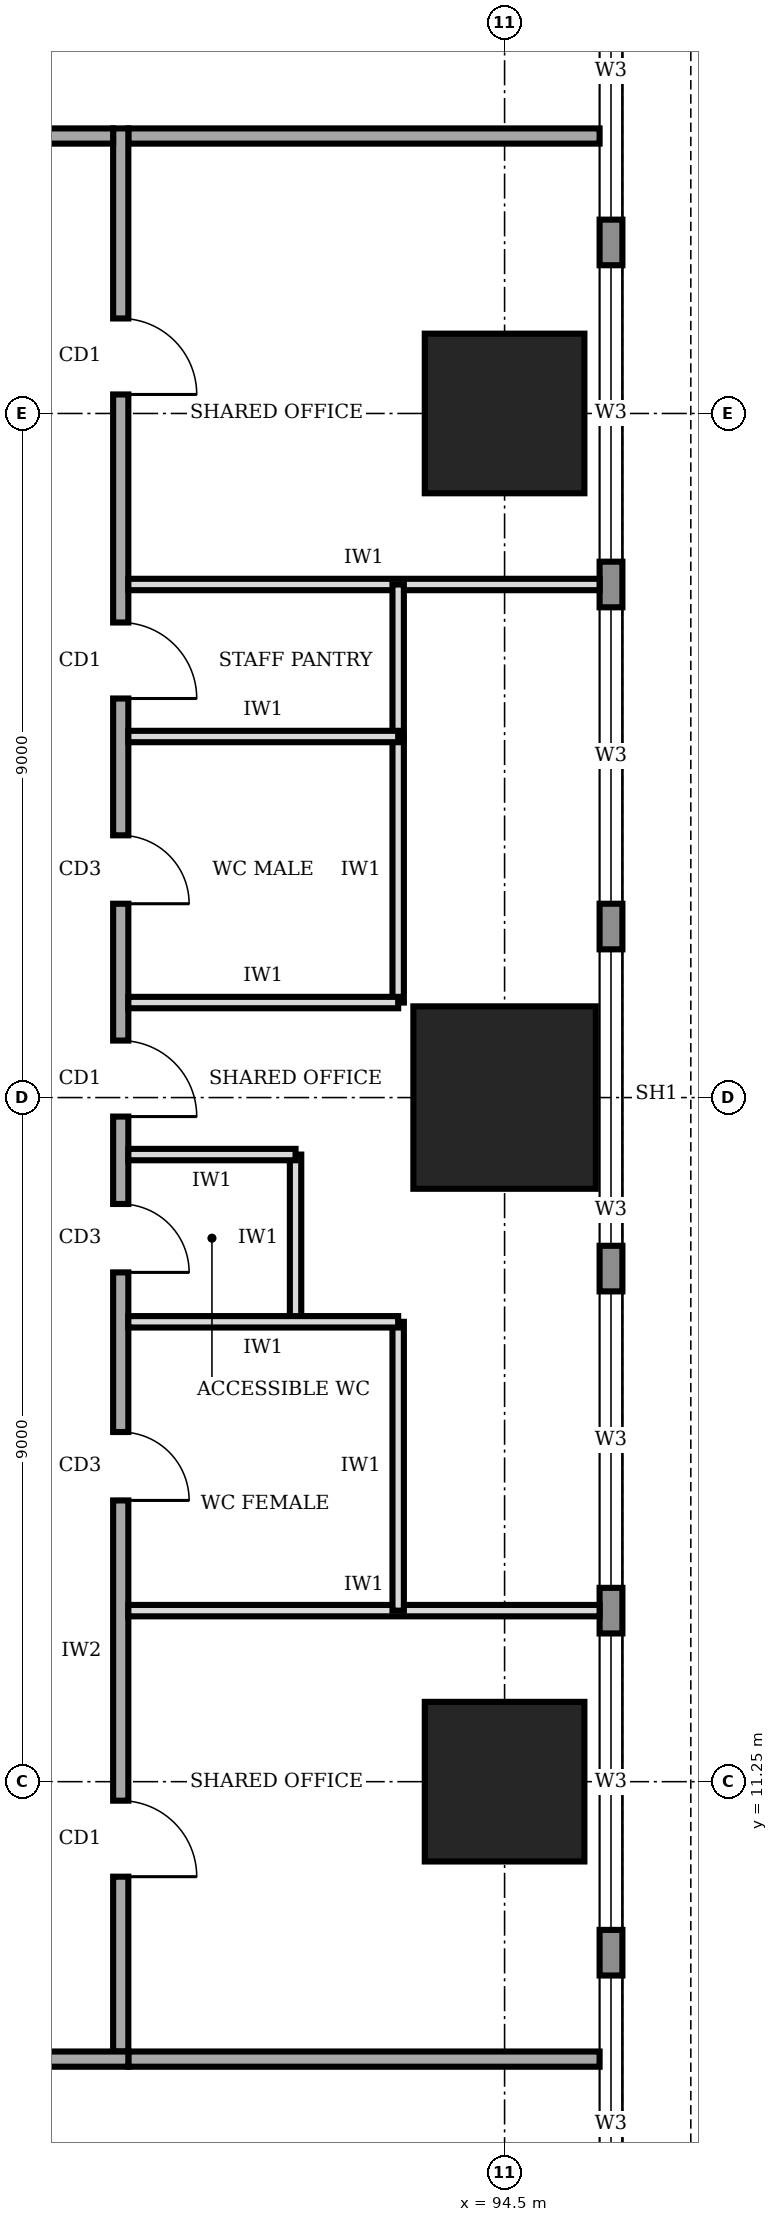
"""IFC4 building model, lengths in metres.
Left out: names, types, materials, properties, quantities, classifications, styles, units other than length and angle.
Written with IfcOpenShell. Run it as: python <this file> out.ifc"""

import sys

from ifc_helpers import new_model, si_unit, direction, frame, frame_2d, origin, origin_2d, place, context, subcontext, project, spatial, rectangle, extrude, element, fill, save


model = new_model("IFC4")
c1 = context("Model", 3, precision=1e-05, world=origin(), true_north=direction((0.0, 1.0)))
c2 = subcontext(c1, "Body", "Model", "MODEL_VIEW")
j1 = project(units=[si_unit("LENGTHUNIT", "METRE"), si_unit("PLANEANGLEUNIT", "RADIAN")], contexts=[c1])
p1 = place(None, origin())
s1 = spatial("IfcSite", under=j1, at=p1, CompositionType="ELEMENT")
p2 = place(p1, origin())
s2 = spatial("IfcBuilding", under=s1, at=p2, CompositionType="ELEMENT")
p3 = place(p2, frame((0.0, 0.0, 93.0)))
s3 = spatial("IfcBuildingStorey", under=s2, at=p3, CompositionType="ELEMENT", Elevation=93.0)
p4 = place(p3, frame((94.5, 11.25, 0.0), z_axis=(0.0, 0.0, 1.0), x_axis=(1.0, 0.0, 0.0)))
e1 = element("IfcColumn", 1, at=p4, inside=s3, PredefinedType="COLUMN", context=c2, shape_type="SweptSolid", body=[
    extrude(rectangle(XDim=2.1, YDim=2.1, at=origin_2d()), origin(), (0.0, 0.0, 1.0), 4.0),
])
p5 = place(p3, frame((94.5, 20.25, 0.0), z_axis=(0.0, 0.0, 1.0), x_axis=(1.0, 0.0, 0.0)))
e2 = element("IfcColumn", 2, at=p5, inside=s3, PredefinedType="COLUMN", context=c2, shape_type="SweptSolid", body=[
    extrude(rectangle(XDim=2.4, YDim=2.4, at=origin_2d()), origin(), (0.0, 0.0, 1.0), 4.0),
])
p6 = place(p3, frame((94.5, 29.25, 0.0), z_axis=(0.0, 0.0, 1.0), x_axis=(1.0, 0.0, 0.0)))
e3 = element("IfcColumn", 3, at=p6, inside=s3, PredefinedType="COLUMN", context=c2, shape_type="SweptSolid", body=[
    extrude(rectangle(XDim=2.1, YDim=2.1, at=origin_2d()), origin(), (0.0, 0.0, 1.0), 4.0),
])
p7 = place(p3, frame((95.9, 3.32, 0.0), z_axis=(0.0, 0.0, 1.0), x_axis=(0.0, 1.0, 0.0)))
e4 = element("IfcWall", 4, at=p7, inside=s3, PredefinedType="STANDARD", context=c2, shape_type="SweptSolid", body=[
    extrude(rectangle(XDim=33.96, YDim=0.3, at=frame_2d((16.98, 0.0))), origin(), (0.0, 0.0, 1.0), 3.75),
])
p8 = place(p7, frame((1.48, 0.0, 0.95)))
e5 = element("IfcOpeningElement", 5, at=p8, cuts=e4, PredefinedType="OPENING", context=c2, shape_type="SweptSolid", body=[
    extrude(rectangle(XDim=3.9, YDim=1.8, at=frame_2d((1.95, 0.9))), frame((0.0, 0.16, 0.0), z_axis=(0.0, -1.0, 0.0), x_axis=(1.0, 0.0, 0.0)), (0.0, 0.0, 1.0), 0.32),
])
p9 = place(p7, frame((5.98, 0.0, 0.95)))
e6 = element("IfcOpeningElement", 6, at=p9, cuts=e4, PredefinedType="OPENING", context=c2, shape_type="SweptSolid", body=[
    extrude(rectangle(XDim=3.9, YDim=1.8, at=frame_2d((1.95, 0.9))), frame((0.0, 0.16, 0.0), z_axis=(0.0, -1.0, 0.0), x_axis=(1.0, 0.0, 0.0)), (0.0, 0.0, 1.0), 0.32),
])
p10 = place(p7, frame((10.48, 0.0, 0.95)))
e7 = element("IfcOpeningElement", 7, at=p10, cuts=e4, PredefinedType="OPENING", context=c2, shape_type="SweptSolid", body=[
    extrude(rectangle(XDim=3.9, YDim=1.8, at=frame_2d((1.95, 0.9))), frame((0.0, 0.16, 0.0), z_axis=(0.0, -1.0, 0.0), x_axis=(1.0, 0.0, 0.0)), (0.0, 0.0, 1.0), 0.32),
])
p11 = place(p7, frame((14.98, 0.0, 0.95)))
e8 = element("IfcOpeningElement", 8, at=p11, cuts=e4, PredefinedType="OPENING", context=c2, shape_type="SweptSolid", body=[
    extrude(rectangle(XDim=3.9, YDim=1.8, at=frame_2d((1.95, 0.9))), frame((0.0, 0.16, 0.0), z_axis=(0.0, -1.0, 0.0), x_axis=(1.0, 0.0, 0.0)), (0.0, 0.0, 1.0), 0.32),
])
p12 = place(p7, frame((19.48, 0.0, 0.95)))
e9 = element("IfcOpeningElement", 9, at=p12, cuts=e4, PredefinedType="OPENING", context=c2, shape_type="SweptSolid", body=[
    extrude(rectangle(XDim=3.9, YDim=1.8, at=frame_2d((1.95, 0.9))), frame((0.0, 0.16, 0.0), z_axis=(0.0, -1.0, 0.0), x_axis=(1.0, 0.0, 0.0)), (0.0, 0.0, 1.0), 0.32),
])
p13 = place(p7, frame((23.98, 0.0, 0.95)))
e10 = element("IfcOpeningElement", 10, at=p13, cuts=e4, PredefinedType="OPENING", context=c2, shape_type="SweptSolid", body=[
    extrude(rectangle(XDim=3.9, YDim=1.8, at=frame_2d((1.95, 0.9))), frame((0.0, 0.16, 0.0), z_axis=(0.0, -1.0, 0.0), x_axis=(1.0, 0.0, 0.0)), (0.0, 0.0, 1.0), 0.32),
])
p14 = place(p7, frame((28.48, 0.0, 0.95)))
e11 = element("IfcOpeningElement", 11, at=p14, cuts=e4, PredefinedType="OPENING", context=c2, shape_type="SweptSolid", body=[
    extrude(rectangle(XDim=3.9, YDim=1.8, at=frame_2d((1.95, 0.9))), frame((0.0, 0.16, 0.0), z_axis=(0.0, -1.0, 0.0), x_axis=(1.0, 0.0, 0.0)), (0.0, 0.0, 1.0), 0.32),
])
p15 = place(p3, frame((63.3, 7.6, 0.0), z_axis=(0.0, 0.0, 1.0), x_axis=(1.0, 0.0, 0.0)))
e12 = element("IfcWall", 12, at=p15, inside=s3, PredefinedType="SOLIDWALL", context=c2, shape_type="SweptSolid", body=[
    extrude(rectangle(XDim=26.25, YDim=0.2, at=frame_2d((13.125, 0.0))), origin(), (0.0, 0.0, 1.0), 3.75),
])
p16 = place(p15, frame((6.0, 0.0, 0.0)))
e13 = element("IfcOpeningElement", 13, at=p16, cuts=e12, PredefinedType="OPENING", context=c2, shape_type="SweptSolid", body=[
    extrude(rectangle(XDim=1.0, YDim=2.1, at=frame_2d((0.5, 1.05))), frame((0.0, 0.11, 0.0), z_axis=(0.0, -1.0, 0.0), x_axis=(1.0, 0.0, 0.0)), (0.0, 0.0, 1.0), 0.22),
])
p17 = place(p15, frame((19.325, 0.0, 0.0)))
e14 = element("IfcOpeningElement", 14, at=p17, cuts=e12, PredefinedType="OPENING", context=c2, shape_type="SweptSolid", body=[
    extrude(rectangle(XDim=1.0, YDim=2.1, at=frame_2d((0.5, 1.05))), frame((0.0, 0.11, 0.0), z_axis=(0.0, -1.0, 0.0), x_axis=(1.0, 0.0, 0.0)), (0.0, 0.0, 1.0), 0.22),
])
p18 = place(p3, frame((89.45, 7.7, 0.0), z_axis=(0.0, 0.0, 1.0), x_axis=(0.0, 1.0, 0.0)))
e15 = element("IfcWall", 15, at=p18, inside=s3, PredefinedType="SOLIDWALL", context=c2, shape_type="SweptSolid", body=[
    extrude(rectangle(XDim=25.3, YDim=0.2, at=frame_2d((12.65, 0.0))), origin(), (0.0, 0.0, 1.0), 3.75),
])
p19 = place(p18, frame((2.3, 0.0, 0.0)))
e16 = element("IfcOpeningElement", 16, at=p19, cuts=e15, PredefinedType="OPENING", context=c2, shape_type="SweptSolid", body=[
    extrude(rectangle(XDim=1.0, YDim=2.1, at=frame_2d((0.5, 1.05))), frame((0.0, 0.11, 0.0), z_axis=(0.0, -1.0, 0.0), x_axis=(1.0, 0.0, 0.0)), (0.0, 0.0, 1.0), 0.22),
])
p20 = place(p18, frame((7.25, 0.0, 0.0)))
e17 = element("IfcOpeningElement", 17, at=p20, cuts=e15, PredefinedType="OPENING", context=c2, shape_type="SweptSolid", body=[
    extrude(rectangle(XDim=0.9, YDim=2.1, at=frame_2d((0.45, 1.05))), frame((0.0, 0.11, 0.0), z_axis=(0.0, -1.0, 0.0), x_axis=(1.0, 0.0, 0.0)), (0.0, 0.0, 1.0), 0.22),
])
p21 = place(p18, frame((10.25, 0.0, 0.0)))
e18 = element("IfcOpeningElement", 18, at=p21, cuts=e15, PredefinedType="OPENING", context=c2, shape_type="SweptSolid", body=[
    extrude(rectangle(XDim=0.9, YDim=2.1, at=frame_2d((0.45, 1.05))), frame((0.0, 0.11, 0.0), z_axis=(0.0, -1.0, 0.0), x_axis=(1.0, 0.0, 0.0)), (0.0, 0.0, 1.0), 0.22),
])
p22 = place(p18, frame((15.1, 0.0, 0.0)))
e19 = element("IfcOpeningElement", 19, at=p22, cuts=e15, PredefinedType="OPENING", context=c2, shape_type="SweptSolid", body=[
    extrude(rectangle(XDim=0.9, YDim=2.1, at=frame_2d((0.45, 1.05))), frame((0.0, 0.11, 0.0), z_axis=(0.0, -1.0, 0.0), x_axis=(1.0, 0.0, 0.0)), (0.0, 0.0, 1.0), 0.22),
])
p23 = place(p18, frame((17.8, 0.0, 0.0)))
e20 = element("IfcOpeningElement", 20, at=p23, cuts=e15, PredefinedType="OPENING", context=c2, shape_type="SweptSolid", body=[
    extrude(rectangle(XDim=1.0, YDim=2.1, at=frame_2d((0.5, 1.05))), frame((0.0, 0.11, 0.0), z_axis=(0.0, -1.0, 0.0), x_axis=(1.0, 0.0, 0.0)), (0.0, 0.0, 1.0), 0.22),
])
p24 = place(p18, frame((12.3, 0.0, 0.0)))
e21 = element("IfcOpeningElement", 21, at=p24, cuts=e15, PredefinedType="OPENING", context=c2, shape_type="SweptSolid", body=[
    extrude(rectangle(XDim=1.0, YDim=2.1, at=frame_2d((0.5, 1.05))), frame((0.0, 0.11, 0.0), z_axis=(0.0, -1.0, 0.0), x_axis=(1.0, 0.0, 0.0)), (0.0, 0.0, 1.0), 0.22),
])
p25 = place(p18, frame((21.8, 0.0, 0.0)))
e22 = element("IfcOpeningElement", 22, at=p25, cuts=e15, PredefinedType="OPENING", context=c2, shape_type="SweptSolid", body=[
    extrude(rectangle(XDim=1.0, YDim=2.1, at=frame_2d((0.5, 1.05))), frame((0.0, 0.11, 0.0), z_axis=(0.0, -1.0, 0.0), x_axis=(1.0, 0.0, 0.0)), (0.0, 0.0, 1.0), 0.22),
])
p26 = place(p3, frame((89.35, 32.9, 0.0), z_axis=(0.0, 0.0, 1.0), x_axis=(-1.0, 0.0, 0.0)))
e23 = element("IfcWall", 23, at=p26, inside=s3, PredefinedType="SOLIDWALL", context=c2, shape_type="SweptSolid", body=[
    extrude(rectangle(XDim=26.05, YDim=0.2, at=frame_2d((13.025, 0.0))), origin(), (0.0, 0.0, 1.0), 3.75),
])
p27 = place(p26, frame((19.05, 0.0, 0.0)))
e24 = element("IfcOpeningElement", 24, at=p27, cuts=e23, PredefinedType="OPENING", context=c2, shape_type="SweptSolid", body=[
    extrude(rectangle(XDim=1.0, YDim=2.1, at=frame_2d((0.5, 1.05))), frame((0.0, 0.11, 0.0), z_axis=(0.0, -1.0, 0.0), x_axis=(1.0, 0.0, 0.0)), (0.0, 0.0, 1.0), 0.22),
])
p28 = place(p26, frame((7.85, 0.0, 0.0)))
e25 = element("IfcOpeningElement", 25, at=p28, cuts=e23, PredefinedType="OPENING", context=c2, shape_type="SweptSolid", body=[
    extrude(rectangle(XDim=1.0, YDim=2.1, at=frame_2d((0.5, 1.05))), frame((0.0, 0.11, 0.0), z_axis=(0.0, -1.0, 0.0), x_axis=(1.0, 0.0, 0.0)), (0.0, 0.0, 1.0), 0.22),
])
p29 = place(p26, frame((1.325, 0.0, 0.0)))
e26 = element("IfcOpeningElement", 26, at=p29, cuts=e23, PredefinedType="OPENING", context=c2, shape_type="SweptSolid", body=[
    extrude(rectangle(XDim=1.0, YDim=2.1, at=frame_2d((0.5, 1.05))), frame((0.0, 0.11, 0.0), z_axis=(0.0, -1.0, 0.0), x_axis=(1.0, 0.0, 0.0)), (0.0, 0.0, 1.0), 0.22),
])
for number, where, z_axis, x_axis in (
    (27, (89.55, 7.6, 0.0), (0.0, 0.0, 1.0), (1.0, 0.0, 0.0)),
    (28, (89.55, 32.9, 0.0), (0.0, 0.0, 1.0), (1.0, 0.0, 0.0)),
):
    element("IfcWall", number, at=place(p3, frame(where, z_axis=z_axis, x_axis=x_axis)), inside=s3, PredefinedType="SOLIDWALL", context=c2, shape_type="SweptSolid", body=[
        extrude(rectangle(XDim=6.2, YDim=0.2, at=frame_2d((3.1, 0.0))), origin(), (0.0, 0.0, 1.0), 3.75),
    ])
for number, where, z_axis, x_axis in (
    (29, (89.55, 13.5, 0.0), (0.0, 0.0, 1.0), (1.0, 0.0, 0.0)),
    (30, (89.55, 27.0, 0.0), (0.0, 0.0, 1.0), (1.0, 0.0, 0.0)),
):
    element("IfcWall", number, at=place(p3, frame(where, z_axis=z_axis, x_axis=x_axis)), inside=s3, PredefinedType="PARTITIONING", context=c2, shape_type="SweptSolid", body=[
        extrude(rectangle(XDim=6.2, YDim=0.15, at=frame_2d((3.1, 0.0))), origin(), (0.0, 0.0, 1.0), 3.75),
    ])
p30 = place(p3, frame((89.55, 17.3, 0.0), z_axis=(0.0, 0.0, 1.0), x_axis=(1.0, 0.0, 0.0)))
e31 = element("IfcWall", 31, at=p30, inside=s3, PredefinedType="PARTITIONING", context=c2, shape_type="SweptSolid", body=[
    extrude(rectangle(XDim=3.55, YDim=0.15, at=frame_2d((1.775, 0.0))), origin(), (0.0, 0.0, 1.0), 3.75),
])
p31 = place(p3, frame((89.55, 19.5, 0.0), z_axis=(0.0, 0.0, 1.0), x_axis=(1.0, 0.0, 0.0)))
e32 = element("IfcWall", 32, at=p31, inside=s3, PredefinedType="PARTITIONING", context=c2, shape_type="SweptSolid", body=[
    extrude(rectangle(XDim=2.2, YDim=0.15, at=frame_2d((1.1, 0.0))), origin(), (0.0, 0.0, 1.0), 2.85),
])
for number, where, z_axis, x_axis in (
    (33, (89.55, 21.5, 0.0), (0.0, 0.0, 1.0), (1.0, 0.0, 0.0)),
    (34, (89.55, 25.0, 0.0), (0.0, 0.0, 1.0), (1.0, 0.0, 0.0)),
):
    element("IfcWall", number, at=place(p3, frame(where, z_axis=z_axis, x_axis=x_axis)), inside=s3, PredefinedType="PARTITIONING", context=c2, shape_type="SweptSolid", body=[
        extrude(rectangle(XDim=3.55, YDim=0.15, at=frame_2d((1.775, 0.0))), origin(), (0.0, 0.0, 1.0), 3.75),
    ])
p32 = place(p3, frame((93.1, 13.5, 0.0), z_axis=(0.0, 0.0, 1.0), x_axis=(0.0, 1.0, 0.0)))
e35 = element("IfcWall", 35, at=p32, inside=s3, PredefinedType="PARTITIONING", context=c2, shape_type="SweptSolid", body=[
    extrude(rectangle(XDim=3.8, YDim=0.15, at=frame_2d((1.9, 0.0))), origin(), (0.0, 0.0, 1.0), 3.75),
])
p33 = place(p3, frame((91.75, 17.3, 0.0), z_axis=(0.0, 0.0, 1.0), x_axis=(0.0, 1.0, 0.0)))
e36 = element("IfcWall", 36, at=p33, inside=s3, PredefinedType="PARTITIONING", context=c2, shape_type="SweptSolid", body=[
    extrude(rectangle(XDim=2.2, YDim=0.15, at=frame_2d((1.1, 0.0))), origin(), (0.0, 0.0, 1.0), 3.75),
])
p34 = place(p3, frame((93.1, 21.5, 0.0), z_axis=(0.0, 0.0, 1.0), x_axis=(0.0, 1.0, 0.0)))
e37 = element("IfcWall", 37, at=p34, inside=s3, PredefinedType="PARTITIONING", context=c2, shape_type="SweptSolid", body=[
    extrude(rectangle(XDim=3.5, YDim=0.15, at=frame_2d((1.75, 0.0))), origin(), (0.0, 0.0, 1.0), 3.75),
])
p35 = place(p3, frame((93.1, 25.0, 0.0), z_axis=(0.0, 0.0, 1.0), x_axis=(0.0, 1.0, 0.0)))
e38 = element("IfcWall", 38, at=p35, inside=s3, PredefinedType="PARTITIONING", context=c2, shape_type="SweptSolid", body=[
    extrude(rectangle(XDim=2.0, YDim=0.15, at=frame_2d((1.0, 0.0))), origin(), (0.0, 0.0, 1.0), 3.75),
])
p36 = place(p8, origin())
e39 = element("IfcWindow", 39, at=p36, inside=s3, PartitioningType="SINGLE_PANEL", PredefinedType="WINDOW", context=c2, shape_type="SweptSolid", body=[
    extrude(rectangle(XDim=3.9, YDim=1.8, at=frame_2d((1.95, 0.9))), frame((0.0, 0.03, 0.0), z_axis=(0.0, -1.0, 0.0), x_axis=(1.0, 0.0, 0.0)), (0.0, 0.0, 1.0), 0.06),
])
fill(e5, e39)
p37 = place(p9, origin())
e40 = element("IfcWindow", 40, at=p37, inside=s3, PartitioningType="SINGLE_PANEL", PredefinedType="WINDOW", context=c2, shape_type="SweptSolid", body=[
    extrude(rectangle(XDim=3.9, YDim=1.8, at=frame_2d((1.95, 0.9))), frame((0.0, 0.03, 0.0), z_axis=(0.0, -1.0, 0.0), x_axis=(1.0, 0.0, 0.0)), (0.0, 0.0, 1.0), 0.06),
])
fill(e6, e40)
p38 = place(p10, origin())
e41 = element("IfcWindow", 41, at=p38, inside=s3, PartitioningType="SINGLE_PANEL", PredefinedType="WINDOW", context=c2, shape_type="SweptSolid", body=[
    extrude(rectangle(XDim=3.9, YDim=1.8, at=frame_2d((1.95, 0.9))), frame((0.0, 0.03, 0.0), z_axis=(0.0, -1.0, 0.0), x_axis=(1.0, 0.0, 0.0)), (0.0, 0.0, 1.0), 0.06),
])
fill(e7, e41)
p39 = place(p11, origin())
e42 = element("IfcWindow", 42, at=p39, inside=s3, PartitioningType="SINGLE_PANEL", PredefinedType="WINDOW", context=c2, shape_type="SweptSolid", body=[
    extrude(rectangle(XDim=3.9, YDim=1.8, at=frame_2d((1.95, 0.9))), frame((0.0, 0.03, 0.0), z_axis=(0.0, -1.0, 0.0), x_axis=(1.0, 0.0, 0.0)), (0.0, 0.0, 1.0), 0.06),
])
fill(e8, e42)
p40 = place(p12, origin())
e43 = element("IfcWindow", 43, at=p40, inside=s3, PartitioningType="SINGLE_PANEL", PredefinedType="WINDOW", context=c2, shape_type="SweptSolid", body=[
    extrude(rectangle(XDim=3.9, YDim=1.8, at=frame_2d((1.95, 0.9))), frame((0.0, 0.03, 0.0), z_axis=(0.0, -1.0, 0.0), x_axis=(1.0, 0.0, 0.0)), (0.0, 0.0, 1.0), 0.06),
])
fill(e9, e43)
p41 = place(p13, origin())
e44 = element("IfcWindow", 44, at=p41, inside=s3, PartitioningType="SINGLE_PANEL", PredefinedType="WINDOW", context=c2, shape_type="SweptSolid", body=[
    extrude(rectangle(XDim=3.9, YDim=1.8, at=frame_2d((1.95, 0.9))), frame((0.0, 0.03, 0.0), z_axis=(0.0, -1.0, 0.0), x_axis=(1.0, 0.0, 0.0)), (0.0, 0.0, 1.0), 0.06),
])
fill(e10, e44)
p42 = place(p14, origin())
e45 = element("IfcWindow", 45, at=p42, inside=s3, PartitioningType="SINGLE_PANEL", PredefinedType="WINDOW", context=c2, shape_type="SweptSolid", body=[
    extrude(rectangle(XDim=3.9, YDim=1.8, at=frame_2d((1.95, 0.9))), frame((0.0, 0.03, 0.0), z_axis=(0.0, -1.0, 0.0), x_axis=(1.0, 0.0, 0.0)), (0.0, 0.0, 1.0), 0.06),
])
fill(e11, e45)
p43 = place(p19, frame((1.0, 0.0, 0.0), z_axis=(0.0, 0.0, 1.0), x_axis=(-1.0, 0.0, 0.0)))
e46 = element("IfcDoor", 46, at=p43, inside=s3, OperationType="SINGLE_SWING_RIGHT", PredefinedType="DOOR", context=c2, shape_type="SweptSolid", body=[
    extrude(rectangle(XDim=1.0, YDim=2.1, at=frame_2d((0.5, 1.05))), frame((0.0, 0.025, 0.0), z_axis=(0.0, -1.0, 0.0), x_axis=(1.0, 0.0, 0.0)), (0.0, 0.0, 1.0), 0.05),
])
fill(e16, e46)
p44 = place(p20, frame((0.9, 0.0, 0.0), z_axis=(0.0, 0.0, 1.0), x_axis=(-1.0, 0.0, 0.0)))
e47 = element("IfcDoor", 47, at=p44, inside=s3, OperationType="SINGLE_SWING_RIGHT", PredefinedType="DOOR", context=c2, shape_type="SweptSolid", body=[
    extrude(rectangle(XDim=0.9, YDim=2.1, at=frame_2d((0.45, 1.05))), frame((0.0, 0.025, 0.0), z_axis=(0.0, -1.0, 0.0), x_axis=(1.0, 0.0, 0.0)), (0.0, 0.0, 1.0), 0.05),
])
fill(e17, e47)
p45 = place(p21, frame((0.9, 0.0, 0.0), z_axis=(0.0, 0.0, 1.0), x_axis=(-1.0, 0.0, 0.0)))
e48 = element("IfcDoor", 48, at=p45, inside=s3, OperationType="SINGLE_SWING_RIGHT", PredefinedType="DOOR", context=c2, shape_type="SweptSolid", body=[
    extrude(rectangle(XDim=0.9, YDim=2.1, at=frame_2d((0.45, 1.05))), frame((0.0, 0.025, 0.0), z_axis=(0.0, -1.0, 0.0), x_axis=(1.0, 0.0, 0.0)), (0.0, 0.0, 1.0), 0.05),
])
fill(e18, e48)
p46 = place(p22, frame((0.9, 0.0, 0.0), z_axis=(0.0, 0.0, 1.0), x_axis=(-1.0, 0.0, 0.0)))
e49 = element("IfcDoor", 49, at=p46, inside=s3, OperationType="SINGLE_SWING_RIGHT", PredefinedType="DOOR", context=c2, shape_type="SweptSolid", body=[
    extrude(rectangle(XDim=0.9, YDim=2.1, at=frame_2d((0.45, 1.05))), frame((0.0, 0.025, 0.0), z_axis=(0.0, -1.0, 0.0), x_axis=(1.0, 0.0, 0.0)), (0.0, 0.0, 1.0), 0.05),
])
fill(e19, e49)
p47 = place(p23, frame((1.0, 0.0, 0.0), z_axis=(0.0, 0.0, 1.0), x_axis=(-1.0, 0.0, 0.0)))
e50 = element("IfcDoor", 50, at=p47, inside=s3, OperationType="SINGLE_SWING_RIGHT", PredefinedType="DOOR", context=c2, shape_type="SweptSolid", body=[
    extrude(rectangle(XDim=1.0, YDim=2.1, at=frame_2d((0.5, 1.05))), frame((0.0, 0.025, 0.0), z_axis=(0.0, -1.0, 0.0), x_axis=(1.0, 0.0, 0.0)), (0.0, 0.0, 1.0), 0.05),
])
fill(e20, e50)
p48 = place(p24, frame((1.0, 0.0, 0.0), z_axis=(0.0, 0.0, 1.0), x_axis=(-1.0, 0.0, 0.0)))
e51 = element("IfcDoor", 51, at=p48, inside=s3, OperationType="SINGLE_SWING_RIGHT", PredefinedType="DOOR", context=c2, shape_type="SweptSolid", body=[
    extrude(rectangle(XDim=1.0, YDim=2.1, at=frame_2d((0.5, 1.05))), frame((0.0, 0.025, 0.0), z_axis=(0.0, -1.0, 0.0), x_axis=(1.0, 0.0, 0.0)), (0.0, 0.0, 1.0), 0.05),
])
fill(e21, e51)
p49 = place(p25, frame((1.0, 0.0, 0.0), z_axis=(0.0, 0.0, 1.0), x_axis=(-1.0, 0.0, 0.0)))
e52 = element("IfcDoor", 52, at=p49, inside=s3, OperationType="SINGLE_SWING_RIGHT", PredefinedType="DOOR", context=c2, shape_type="SweptSolid", body=[
    extrude(rectangle(XDim=1.0, YDim=2.1, at=frame_2d((0.5, 1.05))), frame((0.0, 0.025, 0.0), z_axis=(0.0, -1.0, 0.0), x_axis=(1.0, 0.0, 0.0)), (0.0, 0.0, 1.0), 0.05),
])
fill(e22, e52)
save(model, sys.argv[1])
